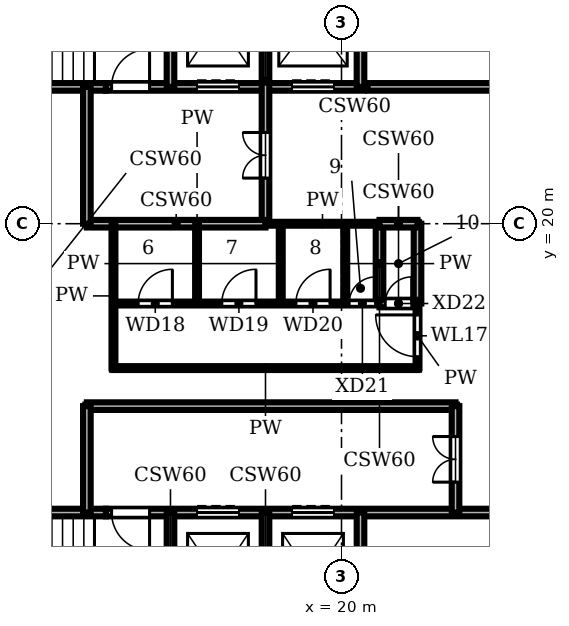
"""IFC4 building model, lengths in metres.
Left out: names, types, materials, properties, quantities, classifications, styles, units other than length and angle.
Written with IfcOpenShell. Run it as: python <this file> out.ifc"""

import sys

from ifc_helpers import new_model, si_unit, direction, frame, frame_2d, origin, place, context, subcontext, project, spatial, rectangle, extrude, element, fill, save


model = new_model("IFC4")
c1 = context("Model", 3, precision=1e-05, world=origin(), true_north=direction((0.0, 1.0)))
c2 = subcontext(c1, "Body", "Model", "MODEL_VIEW")
j1 = project(units=[si_unit("LENGTHUNIT", "METRE"), si_unit("PLANEANGLEUNIT", "RADIAN")], contexts=[c1])
p1 = place(None, origin())
s1 = spatial("IfcSite", under=j1, at=p1, CompositionType="ELEMENT")
p2 = place(p1, origin())
s2 = spatial("IfcBuilding", under=s1, at=p2, CompositionType="ELEMENT")
p3 = place(p2, frame((0.0, 0.0, 341.1)))
s3 = spatial("IfcBuildingStorey", under=s2, at=p3, CompositionType="ELEMENT", Elevation=341.1)
p4 = place(p3, frame((8.5, 12.4, 0.0), z_axis=(0.0, 0.0, 1.0), x_axis=(1.0, 0.0, 0.0)))
e1 = element("IfcWall", 1, at=p4, inside=s3, PredefinedType="SHEAR", context=c2, shape_type="SweptSolid", body=[
    extrude(rectangle(XDim=5.3, YDim=0.2, at=frame_2d((2.65, 0.0))), origin(), (0.0, 0.0, 1.0), 3.58),
])
p5 = place(p3, frame((13.8, 12.4, 0.0), z_axis=(0.0, 0.0, 1.0), x_axis=(1.0, 0.0, 0.0)))
e2 = element("IfcWall", 2, at=p5, inside=s3, PredefinedType="SHEAR", context=c2, shape_type="SweptSolid", body=[
    extrude(rectangle(XDim=13.7, YDim=0.2, at=frame_2d((6.85, 0.0))), origin(), (0.0, 0.0, 1.0), 3.58),
])
p6 = place(p5, frame((2.4, 0.0, 0.0)))
e3 = element("IfcOpeningElement", 3, at=p6, cuts=e2, PredefinedType="OPENING", context=c2, shape_type="SweptSolid", body=[
    extrude(rectangle(XDim=1.1, YDim=2.1, at=frame_2d((0.55, 1.05))), frame((0.0, 0.11, 0.0), z_axis=(0.0, -1.0, 0.0), x_axis=(1.0, 0.0, 0.0)), (0.0, 0.0, 1.0), 0.22),
])
p7 = place(p5, frame((4.9, 0.0, 0.0)))
e4 = element("IfcOpeningElement", 4, at=p7, cuts=e2, PredefinedType="OPENING", context=c2, shape_type="SweptSolid", body=[
    extrude(rectangle(XDim=1.1, YDim=2.1, at=frame_2d((0.55, 1.05))), frame((0.0, 0.11, 0.0), z_axis=(0.0, -1.0, 0.0), x_axis=(1.0, 0.0, 0.0)), (0.0, 0.0, 1.0), 0.22),
])
p8 = place(p5, frame((0.15, 0.0, 0.0)))
e5 = element("IfcOpeningElement", 5, at=p8, cuts=e2, PredefinedType="OPENING", context=c2, shape_type="SweptSolid", body=[
    extrude(rectangle(XDim=1.0, YDim=2.1, at=frame_2d((0.5, 1.05))), frame((0.0, 0.11, 0.0), z_axis=(0.0, -1.0, 0.0), x_axis=(1.0, 0.0, 0.0)), (0.0, 0.0, 1.0), 0.22),
])
p9 = place(p3, frame((13.3, 15.2, 0.0), z_axis=(0.0, 0.0, 1.0), x_axis=(1.0, 0.0, 0.0)))
e6 = element("IfcWall", 6, at=p9, inside=s3, PredefinedType="SHEAR", context=c2, shape_type="SweptSolid", body=[
    extrude(rectangle(XDim=9.7, YDim=0.2, at=frame_2d((4.85, 0.0))), origin(), (0.0, 0.0, 1.0), 3.58),
])
p10 = place(p3, frame((14.0, 16.2, 0.0), z_axis=(0.0, 0.0, 1.0), x_axis=(1.0, 0.0, 0.0)))
e7 = element("IfcWall", 7, at=p10, inside=s3, PredefinedType="PARTITIONING", context=c2, shape_type="SweptSolid", body=[
    extrude(rectangle(XDim=8.0, YDim=0.1, at=frame_2d((4.0, 0.0))), origin(), (0.0, 0.0, 1.0), 3.58),
])
p11 = place(p3, frame((14.0, 17.9, 0.0), z_axis=(0.0, 0.0, 1.0), x_axis=(1.0, 0.0, 0.0)))
e8 = element("IfcWall", 8, at=p11, inside=s3, PredefinedType="PARTITIONING", context=c2, shape_type="SweptSolid", body=[
    extrude(rectangle(XDim=7.0, YDim=0.1, at=frame_2d((3.5, 0.0))), origin(), (0.0, 0.0, 1.0), 3.58),
])
p12 = place(p11, frame((0.65, 0.0, 0.0)))
e9 = element("IfcOpeningElement", 9, at=p12, cuts=e8, PredefinedType="OPENING", context=c2, shape_type="SweptSolid", body=[
    extrude(rectangle(XDim=0.9, YDim=2.1, at=frame_2d((0.45, 1.05))), frame((0.0, 0.06, 0.0), z_axis=(0.0, -1.0, 0.0), x_axis=(1.0, 0.0, 0.0)), (0.0, 0.0, 1.0), 0.12),
])
p13 = place(p11, frame((2.85, 0.0, 0.0)))
e10 = element("IfcOpeningElement", 10, at=p13, cuts=e8, PredefinedType="OPENING", context=c2, shape_type="SweptSolid", body=[
    extrude(rectangle(XDim=0.9, YDim=2.1, at=frame_2d((0.45, 1.05))), frame((0.0, 0.06, 0.0), z_axis=(0.0, -1.0, 0.0), x_axis=(1.0, 0.0, 0.0)), (0.0, 0.0, 1.0), 0.12),
])
p14 = place(p11, frame((4.8, 0.0, 0.0)))
e11 = element("IfcOpeningElement", 11, at=p14, cuts=e8, PredefinedType="OPENING", context=c2, shape_type="SweptSolid", body=[
    extrude(rectangle(XDim=0.9, YDim=2.1, at=frame_2d((0.45, 1.05))), frame((0.0, 0.06, 0.0), z_axis=(0.0, -1.0, 0.0), x_axis=(1.0, 0.0, 0.0)), (0.0, 0.0, 1.0), 0.12),
])
p15 = place(p11, frame((6.2, 0.0, 0.0)))
e12 = element("IfcOpeningElement", 12, at=p15, cuts=e8, PredefinedType="OPENING", context=c2, shape_type="SweptSolid", body=[
    extrude(rectangle(XDim=0.7, YDim=2.1, at=frame_2d((0.35, 1.05))), frame((0.0, 0.06, 0.0), z_axis=(0.0, -1.0, 0.0), x_axis=(1.0, 0.0, 0.0)), (0.0, 0.0, 1.0), 0.12),
])
p16 = place(p3, frame((21.0, 17.9, 0.0), z_axis=(0.0, 0.0, 1.0), x_axis=(1.0, 0.0, 0.0)))
e13 = element("IfcWall", 13, at=p16, inside=s3, PredefinedType="SHEAR", context=c2, shape_type="SweptSolid", body=[
    extrude(rectangle(XDim=1.0, YDim=0.2, at=frame_2d((0.5, 0.0))), origin(), (0.0, 0.0, 1.0), 3.58),
])
p17 = place(p16, frame((0.15, 0.0, 0.0)))
e14 = element("IfcOpeningElement", 14, at=p17, cuts=e13, PredefinedType="OPENING", context=c2, shape_type="SweptSolid", body=[
    extrude(rectangle(XDim=0.7, YDim=2.1, at=frame_2d((0.35, 1.05))), frame((0.0, 0.11, 0.0), z_axis=(0.0, -1.0, 0.0), x_axis=(1.0, 0.0, 0.0)), (0.0, 0.0, 1.0), 0.22),
])
p18 = place(p3, frame((18.0, 20.0, 0.0), z_axis=(0.0, 0.0, 1.0), x_axis=(1.0, 0.0, 0.0)))
e15 = element("IfcWall", 15, at=p18, inside=s3, PredefinedType="PARTITIONING", context=c2, shape_type="SweptSolid", body=[
    extrude(rectangle(XDim=3.0, YDim=0.1, at=frame_2d((1.5, 0.0))), origin(), (0.0, 0.0, 1.0), 3.58),
])
p19 = place(p3, frame((13.3, 20.0, 0.0), z_axis=(0.0, 0.0, 1.0), x_axis=(1.0, 0.0, 0.0)))
e16 = element("IfcWall", 16, at=p19, inside=s3, PredefinedType="SHEAR", context=c2, shape_type="SweptSolid", body=[
    extrude(rectangle(XDim=4.7, YDim=0.2, at=frame_2d((2.35, 0.0))), origin(), (0.0, 0.0, 1.0), 3.58),
])
p20 = place(p3, frame((21.0, 20.0, 0.0), z_axis=(0.0, 0.0, 1.0), x_axis=(1.0, 0.0, 0.0)))
e17 = element("IfcWall", 17, at=p20, inside=s3, PredefinedType="SHEAR", context=c2, shape_type="SweptSolid", body=[
    extrude(rectangle(XDim=1.0, YDim=0.2, at=frame_2d((0.5, 0.0))), origin(), (0.0, 0.0, 1.0), 3.58),
])
p21 = place(p3, frame((8.5, 23.6, 0.0), z_axis=(0.0, 0.0, 1.0), x_axis=(1.0, 0.0, 0.0)))
e18 = element("IfcWall", 18, at=p21, inside=s3, PredefinedType="SHEAR", context=c2, shape_type="SweptSolid", body=[
    extrude(rectangle(XDim=5.3, YDim=0.2, at=frame_2d((2.65, 0.0))), origin(), (0.0, 0.0, 1.0), 3.58),
])
p22 = place(p3, frame((13.8, 23.6, 0.0), z_axis=(0.0, 0.0, 1.0), x_axis=(1.0, 0.0, 0.0)))
e19 = element("IfcWall", 19, at=p22, inside=s3, PredefinedType="SHEAR", context=c2, shape_type="SweptSolid", body=[
    extrude(rectangle(XDim=13.7, YDim=0.2, at=frame_2d((6.85, 0.0))), origin(), (0.0, 0.0, 1.0), 3.58),
])
p23 = place(p22, frame((2.4, 0.0, 0.0)))
e20 = element("IfcOpeningElement", 20, at=p23, cuts=e19, PredefinedType="OPENING", context=c2, shape_type="SweptSolid", body=[
    extrude(rectangle(XDim=1.1, YDim=2.1, at=frame_2d((0.55, 1.05))), frame((0.0, 0.11, 0.0), z_axis=(0.0, -1.0, 0.0), x_axis=(1.0, 0.0, 0.0)), (0.0, 0.0, 1.0), 0.22),
])
p24 = place(p22, frame((4.9, 0.0, 0.0)))
e21 = element("IfcOpeningElement", 21, at=p24, cuts=e19, PredefinedType="OPENING", context=c2, shape_type="SweptSolid", body=[
    extrude(rectangle(XDim=1.1, YDim=2.1, at=frame_2d((0.55, 1.05))), frame((0.0, 0.11, 0.0), z_axis=(0.0, -1.0, 0.0), x_axis=(1.0, 0.0, 0.0)), (0.0, 0.0, 1.0), 0.22),
])
p25 = place(p22, frame((0.15, 0.0, 0.0)))
e22 = element("IfcOpeningElement", 22, at=p25, cuts=e19, PredefinedType="OPENING", context=c2, shape_type="SweptSolid", body=[
    extrude(rectangle(XDim=1.0, YDim=2.1, at=frame_2d((0.5, 1.05))), frame((0.0, 0.11, 0.0), z_axis=(0.0, -1.0, 0.0), x_axis=(1.0, 0.0, 0.0)), (0.0, 0.0, 1.0), 0.22),
])
p26 = place(p3, frame((13.3, 12.4, 0.0), z_axis=(0.0, 0.0, 1.0), x_axis=(0.0, 1.0, 0.0)))
e23 = element("IfcWall", 23, at=p26, inside=s3, PredefinedType="SHEAR", context=c2, shape_type="SweptSolid", body=[
    extrude(rectangle(XDim=2.8, YDim=0.2, at=frame_2d((1.4, 0.0))), origin(), (0.0, 0.0, 1.0), 3.58),
])
p27 = place(p3, frame((13.3, 20.0, 0.0), z_axis=(0.0, 0.0, 1.0), x_axis=(0.0, 1.0, 0.0)))
e24 = element("IfcWall", 24, at=p27, inside=s3, PredefinedType="SHEAR", context=c2, shape_type="SweptSolid", body=[
    extrude(rectangle(XDim=3.6, YDim=0.2, at=frame_2d((1.8, 0.0))), origin(), (0.0, 0.0, 1.0), 3.58),
])
p28 = place(p3, frame((14.0, 16.2, 0.0), z_axis=(0.0, 0.0, 1.0), x_axis=(0.0, 1.0, 0.0)))
e25 = element("IfcWall", 25, at=p28, inside=s3, PredefinedType="PARTITIONING", context=c2, shape_type="SweptSolid", body=[
    extrude(rectangle(XDim=3.8, YDim=0.1, at=frame_2d((1.9, 0.0))), origin(), (0.0, 0.0, 1.0), 3.58),
])
for number, where, z_axis, x_axis in (
    (26, (15.5, 8.5, 0.0), (0.0, 0.0, 1.0), (0.0, 1.0, 0.0)),
    (27, (15.5, 23.6, 0.0), (0.0, 0.0, 1.0), (0.0, 1.0, 0.0)),
):
    element("IfcWall", number, at=place(p3, frame(where, z_axis=z_axis, x_axis=x_axis)), inside=s3, PredefinedType="SHEAR", context=c2, shape_type="SweptSolid", body=[
        extrude(rectangle(XDim=3.9, YDim=0.2, at=frame_2d((1.95, 0.0))), origin(), (0.0, 0.0, 1.0), 3.58),
    ])
p29 = place(p3, frame((16.2, 17.9, 0.0), z_axis=(0.0, 0.0, 1.0), x_axis=(0.0, 1.0, 0.0)))
e28 = element("IfcWall", 28, at=p29, inside=s3, PredefinedType="PARTITIONING", context=c2, shape_type="SweptSolid", body=[
    extrude(rectangle(XDim=2.1, YDim=0.1, at=frame_2d((1.05, 0.0))), origin(), (0.0, 0.0, 1.0), 3.58),
])
p30 = place(p3, frame((18.0, 8.5, 0.0), z_axis=(0.0, 0.0, 1.0), x_axis=(0.0, 1.0, 0.0)))
e29 = element("IfcWall", 29, at=p30, inside=s3, PredefinedType="SHEAR", context=c2, shape_type="SweptSolid", body=[
    extrude(rectangle(XDim=3.9, YDim=0.2, at=frame_2d((1.95, 0.0))), origin(), (0.0, 0.0, 1.0), 3.58),
])
p31 = place(p3, frame((18.0, 20.0, 0.0), z_axis=(0.0, 0.0, 1.0), x_axis=(0.0, 1.0, 0.0)))
e30 = element("IfcWall", 30, at=p31, inside=s3, PredefinedType="SHEAR", context=c2, shape_type="SweptSolid", body=[
    extrude(rectangle(XDim=7.5, YDim=0.2, at=frame_2d((3.75, 0.0))), origin(), (0.0, 0.0, 1.0), 3.58),
])
p32 = place(p31, frame((1.2, 0.0, 0.0)))
e31 = element("IfcOpeningElement", 31, at=p32, cuts=e30, PredefinedType="OPENING", context=c2, shape_type="SweptSolid", body=[
    extrude(rectangle(XDim=1.2, YDim=2.1, at=frame_2d((0.6, 1.05))), frame((0.0, 0.11, 0.0), z_axis=(0.0, -1.0, 0.0), x_axis=(1.0, 0.0, 0.0)), (0.0, 0.0, 1.0), 0.22),
])
for number, where, z_axis, x_axis in (
    (32, (18.4, 17.9, 0.0), (0.0, 0.0, 1.0), (0.0, 1.0, 0.0)),
    (33, (20.1, 17.9, 0.0), (0.0, 0.0, 1.0), (0.0, 1.0, 0.0)),
):
    element("IfcWall", number, at=place(p3, frame(where, z_axis=z_axis, x_axis=x_axis)), inside=s3, PredefinedType="PARTITIONING", context=c2, shape_type="SweptSolid", body=[
        extrude(rectangle(XDim=2.1, YDim=0.1, at=frame_2d((1.05, 0.0))), origin(), (0.0, 0.0, 1.0), 3.58),
    ])
for number, where, z_axis, x_axis in (
    (34, (20.5, 8.5, 0.0), (0.0, 0.0, 1.0), (0.0, 1.0, 0.0)),
    (35, (20.5, 23.6, 0.0), (0.0, 0.0, 1.0), (0.0, 1.0, 0.0)),
):
    element("IfcWall", number, at=place(p3, frame(where, z_axis=z_axis, x_axis=x_axis)), inside=s3, PredefinedType="SHEAR", context=c2, shape_type="SweptSolid", body=[
        extrude(rectangle(XDim=3.9, YDim=0.2, at=frame_2d((1.95, 0.0))), origin(), (0.0, 0.0, 1.0), 3.58),
    ])
p33 = place(p3, frame((21.0, 17.9, 0.0), z_axis=(0.0, 0.0, 1.0), x_axis=(0.0, 1.0, 0.0)))
e36 = element("IfcWall", 36, at=p33, inside=s3, PredefinedType="SHEAR", context=c2, shape_type="SweptSolid", body=[
    extrude(rectangle(XDim=2.1, YDim=0.2, at=frame_2d((1.05, 0.0))), origin(), (0.0, 0.0, 1.0), 3.58),
])
p34 = place(p3, frame((22.0, 16.2, 0.0), z_axis=(0.0, 0.0, 1.0), x_axis=(0.0, 1.0, 0.0)))
e37 = element("IfcWall", 37, at=p34, inside=s3, PredefinedType="PARTITIONING", context=c2, shape_type="SweptSolid", body=[
    extrude(rectangle(XDim=1.7, YDim=0.1, at=frame_2d((0.85, 0.0))), origin(), (0.0, 0.0, 1.0), 3.58),
])
p35 = place(p34, frame((0.3, 0.0, 0.0)))
e38 = element("IfcOpeningElement", 38, at=p35, cuts=e37, PredefinedType="OPENING", context=c2, shape_type="SweptSolid", body=[
    extrude(rectangle(XDim=1.1, YDim=2.1, at=frame_2d((0.55, 1.05))), frame((0.0, 0.06, 0.0), z_axis=(0.0, -1.0, 0.0), x_axis=(1.0, 0.0, 0.0)), (0.0, 0.0, 1.0), 0.12),
])
p36 = place(p3, frame((22.0, 17.9, 0.0), z_axis=(0.0, 0.0, 1.0), x_axis=(0.0, 1.0, 0.0)))
e39 = element("IfcWall", 39, at=p36, inside=s3, PredefinedType="SHEAR", context=c2, shape_type="SweptSolid", body=[
    extrude(rectangle(XDim=2.1, YDim=0.2, at=frame_2d((1.05, 0.0))), origin(), (0.0, 0.0, 1.0), 3.58),
])
p37 = place(p3, frame((23.0, 12.4, 0.0), z_axis=(0.0, 0.0, 1.0), x_axis=(0.0, 1.0, 0.0)))
e40 = element("IfcWall", 40, at=p37, inside=s3, PredefinedType="SHEAR", context=c2, shape_type="SweptSolid", body=[
    extrude(rectangle(XDim=2.8, YDim=0.2, at=frame_2d((1.4, 0.0))), origin(), (0.0, 0.0, 1.0), 3.58),
])
p38 = place(p37, frame((0.8, 0.0, 0.0)))
e41 = element("IfcOpeningElement", 41, at=p38, cuts=e40, PredefinedType="OPENING", context=c2, shape_type="SweptSolid", body=[
    extrude(rectangle(XDim=1.2, YDim=2.1, at=frame_2d((0.6, 1.05))), frame((0.0, 0.11, 0.0), z_axis=(0.0, -1.0, 0.0), x_axis=(1.0, 0.0, 0.0)), (0.0, 0.0, 1.0), 0.22),
])
p39 = place(p6, origin())
e42 = element("IfcDoor", 42, at=p39, inside=s3, OperationType="DOUBLE_DOOR_SLIDING", PredefinedType="DOOR", context=c2, shape_type="SweptSolid", body=[
    extrude(rectangle(XDim=1.1, YDim=2.1, at=frame_2d((0.55, 1.05))), frame((0.0, 0.025, 0.0), z_axis=(0.0, -1.0, 0.0), x_axis=(1.0, 0.0, 0.0)), (0.0, 0.0, 1.0), 0.05),
])
fill(e3, e42)
p40 = place(p7, origin())
e43 = element("IfcDoor", 43, at=p40, inside=s3, OperationType="DOUBLE_DOOR_SLIDING", PredefinedType="DOOR", context=c2, shape_type="SweptSolid", body=[
    extrude(rectangle(XDim=1.1, YDim=2.1, at=frame_2d((0.55, 1.05))), frame((0.0, 0.025, 0.0), z_axis=(0.0, -1.0, 0.0), x_axis=(1.0, 0.0, 0.0)), (0.0, 0.0, 1.0), 0.05),
])
fill(e4, e43)
p41 = place(p23, origin())
e44 = element("IfcDoor", 44, at=p41, inside=s3, OperationType="DOUBLE_DOOR_SLIDING", PredefinedType="DOOR", context=c2, shape_type="SweptSolid", body=[
    extrude(rectangle(XDim=1.1, YDim=2.1, at=frame_2d((0.55, 1.05))), frame((0.0, 0.025, 0.0), z_axis=(0.0, -1.0, 0.0), x_axis=(1.0, 0.0, 0.0)), (0.0, 0.0, 1.0), 0.05),
])
fill(e20, e44)
p42 = place(p24, origin())
e45 = element("IfcDoor", 45, at=p42, inside=s3, OperationType="DOUBLE_DOOR_SLIDING", PredefinedType="DOOR", context=c2, shape_type="SweptSolid", body=[
    extrude(rectangle(XDim=1.1, YDim=2.1, at=frame_2d((0.55, 1.05))), frame((0.0, 0.025, 0.0), z_axis=(0.0, -1.0, 0.0), x_axis=(1.0, 0.0, 0.0)), (0.0, 0.0, 1.0), 0.05),
])
fill(e21, e45)
p43 = place(p8, frame((1.0, 0.0, 0.0), z_axis=(0.0, 0.0, 1.0), x_axis=(-1.0, 0.0, 0.0)))
e46 = element("IfcDoor", 46, at=p43, inside=s3, OperationType="SINGLE_SWING_LEFT", PredefinedType="DOOR", context=c2, shape_type="SweptSolid", body=[
    extrude(rectangle(XDim=1.0, YDim=2.1, at=frame_2d((0.5, 1.05))), frame((0.0, 0.025, 0.0), z_axis=(0.0, -1.0, 0.0), x_axis=(1.0, 0.0, 0.0)), (0.0, 0.0, 1.0), 0.05),
])
fill(e5, e46)
p44 = place(p25, origin())
e47 = element("IfcDoor", 47, at=p44, inside=s3, OperationType="SINGLE_SWING_RIGHT", PredefinedType="DOOR", context=c2, shape_type="SweptSolid", body=[
    extrude(rectangle(XDim=1.0, YDim=2.1, at=frame_2d((0.5, 1.05))), frame((0.0, 0.025, 0.0), z_axis=(0.0, -1.0, 0.0), x_axis=(1.0, 0.0, 0.0)), (0.0, 0.0, 1.0), 0.05),
])
fill(e22, e47)
p45 = place(p38, origin())
e48 = element("IfcDoor", 48, at=p45, inside=s3, OperationType="DOUBLE_DOOR_SINGLE_SWING", PredefinedType="DOOR", context=c2, shape_type="SweptSolid", body=[
    extrude(rectangle(XDim=1.2, YDim=2.1, at=frame_2d((0.6, 1.05))), frame((0.0, 0.025, 0.0), z_axis=(0.0, -1.0, 0.0), x_axis=(1.0, 0.0, 0.0)), (0.0, 0.0, 1.0), 0.05),
])
fill(e41, e48)
p46 = place(p32, origin())
e49 = element("IfcDoor", 49, at=p46, inside=s3, OperationType="DOUBLE_DOOR_SINGLE_SWING", PredefinedType="DOOR", context=c2, shape_type="SweptSolid", body=[
    extrude(rectangle(XDim=1.2, YDim=2.1, at=frame_2d((0.6, 1.05))), frame((0.0, 0.025, 0.0), z_axis=(0.0, -1.0, 0.0), x_axis=(1.0, 0.0, 0.0)), (0.0, 0.0, 1.0), 0.05),
])
fill(e31, e49)
p47 = place(p35, origin())
e50 = element("IfcDoor", 50, at=p47, inside=s3, OperationType="SINGLE_SWING_RIGHT", PredefinedType="DOOR", context=c2, shape_type="SweptSolid", body=[
    extrude(rectangle(XDim=1.1, YDim=2.1, at=frame_2d((0.55, 1.05))), frame((0.0, 0.025, 0.0), z_axis=(0.0, -1.0, 0.0), x_axis=(1.0, 0.0, 0.0)), (0.0, 0.0, 1.0), 0.05),
])
fill(e38, e50)
p48 = place(p12, origin())
e51 = element("IfcDoor", 51, at=p48, inside=s3, OperationType="SINGLE_SWING_RIGHT", PredefinedType="DOOR", context=c2, shape_type="SweptSolid", body=[
    extrude(rectangle(XDim=0.9, YDim=2.1, at=frame_2d((0.45, 1.05))), frame((0.0, 0.025, 0.0), z_axis=(0.0, -1.0, 0.0), x_axis=(1.0, 0.0, 0.0)), (0.0, 0.0, 1.0), 0.05),
])
fill(e9, e51)
p49 = place(p13, origin())
e52 = element("IfcDoor", 52, at=p49, inside=s3, OperationType="SINGLE_SWING_RIGHT", PredefinedType="DOOR", context=c2, shape_type="SweptSolid", body=[
    extrude(rectangle(XDim=0.9, YDim=2.1, at=frame_2d((0.45, 1.05))), frame((0.0, 0.025, 0.0), z_axis=(0.0, -1.0, 0.0), x_axis=(1.0, 0.0, 0.0)), (0.0, 0.0, 1.0), 0.05),
])
fill(e10, e52)
p50 = place(p14, origin())
e53 = element("IfcDoor", 53, at=p50, inside=s3, OperationType="SINGLE_SWING_RIGHT", PredefinedType="DOOR", context=c2, shape_type="SweptSolid", body=[
    extrude(rectangle(XDim=0.9, YDim=2.1, at=frame_2d((0.45, 1.05))), frame((0.0, 0.025, 0.0), z_axis=(0.0, -1.0, 0.0), x_axis=(1.0, 0.0, 0.0)), (0.0, 0.0, 1.0), 0.05),
])
fill(e11, e53)
p51 = place(p15, origin())
e54 = element("IfcDoor", 54, at=p51, inside=s3, OperationType="SINGLE_SWING_RIGHT", PredefinedType="DOOR", context=c2, shape_type="SweptSolid", body=[
    extrude(rectangle(XDim=0.7, YDim=2.1, at=frame_2d((0.35, 1.05))), frame((0.0, 0.025, 0.0), z_axis=(0.0, -1.0, 0.0), x_axis=(1.0, 0.0, 0.0)), (0.0, 0.0, 1.0), 0.05),
])
fill(e12, e54)
p52 = place(p17, origin())
e55 = element("IfcDoor", 55, at=p52, inside=s3, OperationType="SINGLE_SWING_RIGHT", PredefinedType="DOOR", context=c2, shape_type="SweptSolid", body=[
    extrude(rectangle(XDim=0.7, YDim=2.1, at=frame_2d((0.35, 1.05))), frame((0.0, 0.025, 0.0), z_axis=(0.0, -1.0, 0.0), x_axis=(1.0, 0.0, 0.0)), (0.0, 0.0, 1.0), 0.05),
])
fill(e14, e55)
save(model, sys.argv[1])
